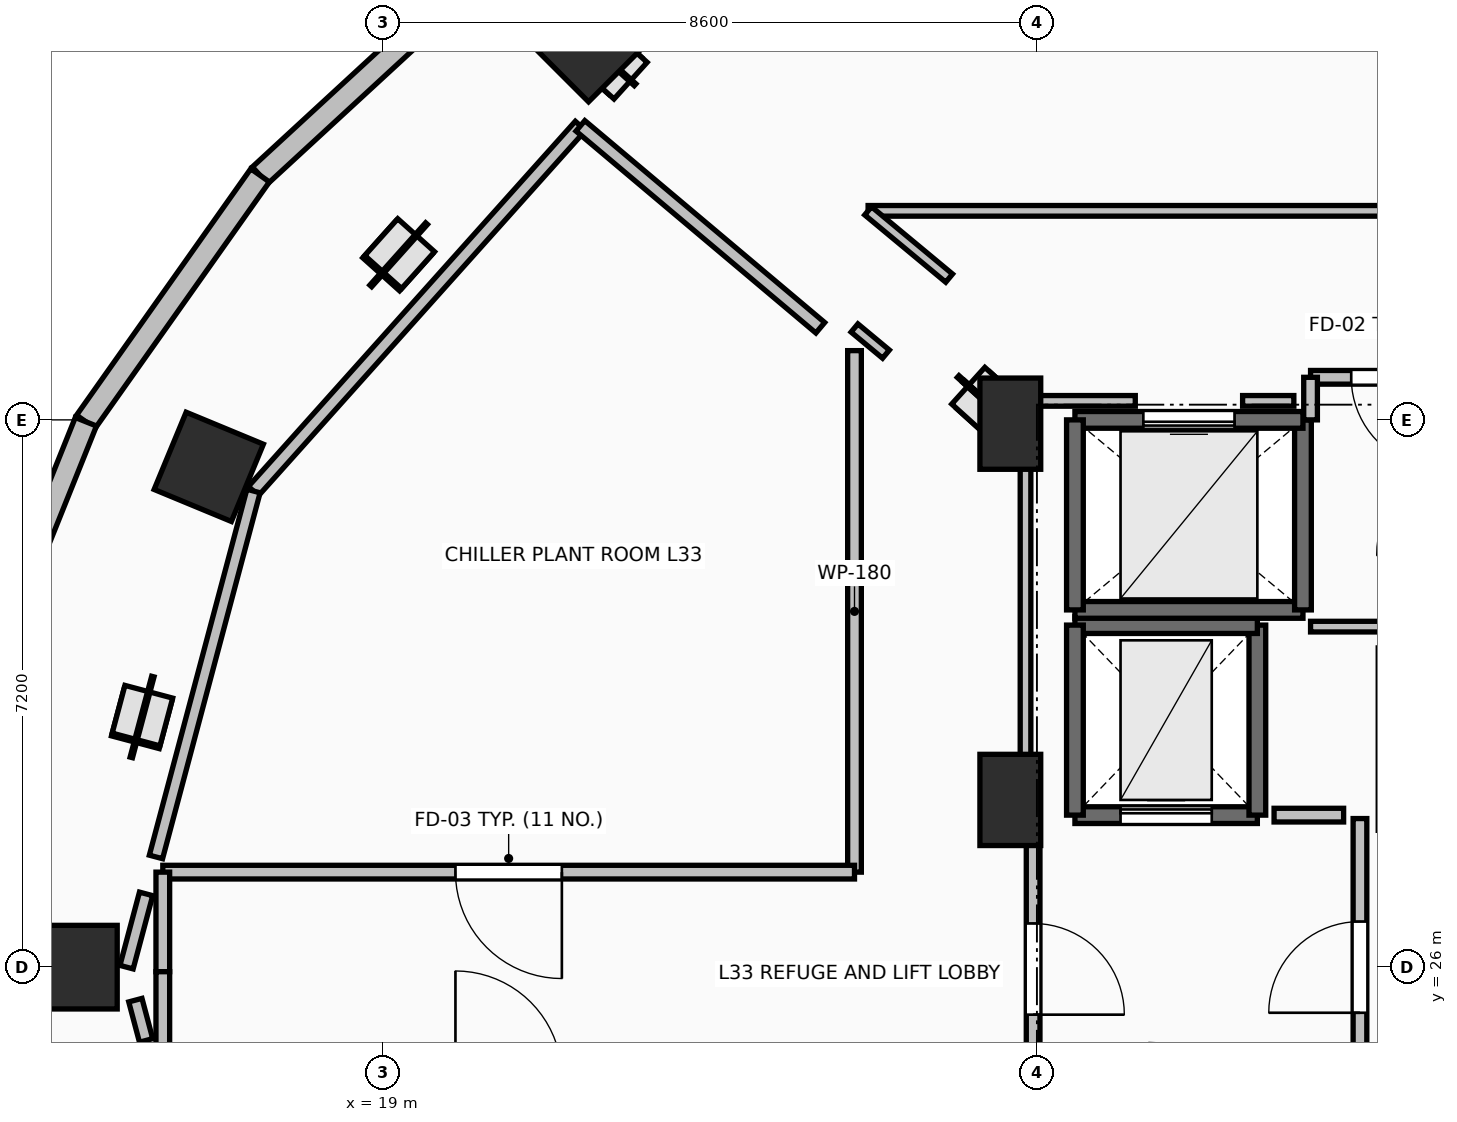
"""IFC4 building model, lengths in metres.
Left out: names, types, materials, properties, quantities, classifications, styles, units other than length and angle.
Written with IfcOpenShell. Run it as: python <this file> out.ifc"""

import sys

from ifc_helpers import new_model, si_unit, direction, frame, frame_2d, origin, origin_2d, place, context, subcontext, project, spatial, rectangle, extrude, element, fill, save


model = new_model("IFC4")
c1 = context("Model", 3, precision=1e-05, world=origin(), true_north=direction((0.0, 1.0)))
c2 = subcontext(c1, "Body", "Model", "MODEL_VIEW")
j1 = project(units=[si_unit("LENGTHUNIT", "METRE"), si_unit("PLANEANGLEUNIT", "RADIAN")], contexts=[c1])
p1 = place(None, origin())
s1 = spatial("IfcSite", under=j1, at=p1, CompositionType="ELEMENT")
p2 = place(p1, origin())
s2 = spatial("IfcBuilding", under=s1, at=p2, CompositionType="ELEMENT")
p3 = place(p2, frame((0.0, 0.0, 124.3)))
s3 = spatial("IfcBuildingStorey", under=s2, at=p3, CompositionType="ELEMENT", Elevation=124.3)
for number, where, z_axis, x_axis in (
    (1, (21.701, 38.162, 0.0), (0.0, 0.0, 1.0), (-0.707, 0.707, 0.0)),
    (2, (16.705, 32.582, 0.0), (0.0, 0.0, 1.0), (-0.924, 0.383, 0.0)),
    (3, (14.95, 26.0, 0.0), (0.0, 0.0, 1.0), (-1.0, 0.0, 0.0)),
):
    element("IfcColumn", number, at=place(p3, frame(where, z_axis=z_axis, x_axis=x_axis)), inside=s3, PredefinedType="COLUMN", context=c2, shape_type="SweptSolid", body=[
        extrude(rectangle(XDim=1.1, YDim=1.1, at=origin_2d()), origin(), (0.0, 0.0, 1.0), 4.8),
    ])
for number, where, z_axis, x_axis in (
    (4, (27.25, 28.2, 0.0), (0.0, 0.0, 1.0), (1.0, 0.0, 0.0)),
    (5, (27.25, 33.15, 0.0), (0.0, 0.0, 1.0), (1.0, 0.0, 0.0)),
):
    element("IfcColumn", number, at=place(p3, frame(where, z_axis=z_axis, x_axis=x_axis)), inside=s3, PredefinedType="PILASTER", context=c2, shape_type="SweptSolid", body=[
        extrude(rectangle(XDim=0.8, YDim=1.2, at=origin_2d()), origin(), (0.0, 0.0, 1.0), 4.8),
    ])
p4 = place(p3, frame((20.464, 39.258, 0.0), z_axis=(0.0, 0.0, 1.0), x_axis=(-0.735477154165, -0.677549522693, 0.0)))
e6 = element("IfcWall", 6, at=p4, inside=s3, PredefinedType="STANDARD", context=c2, shape_type="SweptSolid", body=[
    extrude(rectangle(XDim=4.194, YDim=0.3, at=frame_2d((2.097, 0.0))), origin(), (0.0, 0.0, 1.0), 4.54),
])
p5 = place(p3, frame((17.38, 36.417, 0.0), z_axis=(0.0, 0.0, 1.0), x_axis=(-0.577269753207, -0.816553508371, 0.0)))
e7 = element("IfcWall", 7, at=p5, inside=s3, PredefinedType="STANDARD", context=c2, shape_type="SweptSolid", body=[
    extrude(rectangle(XDim=3.97, YDim=0.3, at=frame_2d((1.985, 0.0))), origin(), (0.0, 0.0, 1.0), 4.54),
])
p6 = place(p3, frame((15.088, 33.175, 0.0), z_axis=(0.0, 0.0, 1.0), x_axis=(-0.372401154411, -0.928071861546, 0.0)))
e8 = element("IfcWall", 8, at=p6, inside=s3, PredefinedType="STANDARD", context=c2, shape_type="SweptSolid", body=[
    extrude(rectangle(XDim=3.79, YDim=0.3, at=frame_2d((1.895, 0.0))), origin(), (0.0, 0.0, 1.0), 4.54),
])
p7 = place(p3, frame((28.1, 28.0, 0.0), z_axis=(0.0, 0.0, 1.0), x_axis=(1.0, 0.0, 0.0)))
e9 = element("IfcWall", 9, at=p7, inside=s3, PredefinedType="SHEAR", context=c2, shape_type="SweptSolid", body=[
    extrude(rectangle(XDim=2.4, YDim=0.22, at=frame_2d((1.2, 0.0))), origin(), (0.0, 0.0, 1.0), 4.54),
])
p8 = place(p7, frame((0.6, 0.0, 0.0)))
e10 = element("IfcOpeningElement", 10, at=p8, cuts=e9, PredefinedType="OPENING", context=c2, shape_type="SweptSolid", body=[
    extrude(rectangle(XDim=1.2, YDim=2.2, at=frame_2d((0.6, 1.1))), frame((0.0, 0.125, 0.0), z_axis=(0.0, -1.0, 0.0), x_axis=(1.0, 0.0, 0.0)), (0.0, 0.0, 1.0), 0.25),
])
p9 = place(p3, frame((30.5, 28.0, 0.0), z_axis=(0.0, 0.0, 1.0), x_axis=(0.0, 1.0, 0.0)))
e11 = element("IfcWall", 11, at=p9, inside=s3, PredefinedType="SHEAR", context=c2, shape_type="SweptSolid", body=[
    extrude(rectangle(XDim=2.5, YDim=0.22, at=frame_2d((1.25, 0.0))), origin(), (0.0, 0.0, 1.0), 4.54),
])
p10 = place(p3, frame((30.5, 30.5, 0.0), z_axis=(0.0, 0.0, 1.0), x_axis=(-1.0, 0.0, 0.0)))
e12 = element("IfcWall", 12, at=p10, inside=s3, PredefinedType="SHEAR", context=c2, shape_type="SweptSolid", body=[
    extrude(rectangle(XDim=2.4, YDim=0.22, at=frame_2d((1.2, 0.0))), origin(), (0.0, 0.0, 1.0), 4.54),
])
p11 = place(p3, frame((28.1, 30.5, 0.0), z_axis=(0.0, 0.0, 1.0), x_axis=(0.0, -1.0, 0.0)))
e13 = element("IfcWall", 13, at=p11, inside=s3, PredefinedType="SHEAR", context=c2, shape_type="SweptSolid", body=[
    extrude(rectangle(XDim=2.5, YDim=0.22, at=frame_2d((1.25, 0.0))), origin(), (0.0, 0.0, 1.0), 4.54),
])
p12 = place(p3, frame((28.1, 30.7, 0.0), z_axis=(0.0, 0.0, 1.0), x_axis=(1.0, 0.0, 0.0)))
e14 = element("IfcWall", 14, at=p12, inside=s3, PredefinedType="SOLIDWALL", context=c2, shape_type="SweptSolid", body=[
    extrude(rectangle(XDim=3.0, YDim=0.22, at=frame_2d((1.5, 0.0))), origin(), (0.0, 0.0, 1.0), 4.54),
])
p13 = place(p3, frame((31.1, 30.7, 0.0), z_axis=(0.0, 0.0, 1.0), x_axis=(0.0, 1.0, 0.0)))
e15 = element("IfcWall", 15, at=p13, inside=s3, PredefinedType="SOLIDWALL", context=c2, shape_type="SweptSolid", body=[
    extrude(rectangle(XDim=2.5, YDim=0.22, at=frame_2d((1.25, 0.0))), origin(), (0.0, 0.0, 1.0), 4.54),
])
p14 = place(p3, frame((31.1, 33.2, 0.0), z_axis=(0.0, 0.0, 1.0), x_axis=(-1.0, 0.0, 0.0)))
e16 = element("IfcWall", 16, at=p14, inside=s3, PredefinedType="SOLIDWALL", context=c2, shape_type="SweptSolid", body=[
    extrude(rectangle(XDim=3.0, YDim=0.22, at=frame_2d((1.5, 0.0))), origin(), (0.0, 0.0, 1.0), 4.54),
])
p15 = place(p14, frame((0.9, 0.0, 0.0)))
e17 = element("IfcOpeningElement", 17, at=p15, cuts=e16, PredefinedType="OPENING", context=c2, shape_type="SweptSolid", body=[
    extrude(rectangle(XDim=1.2, YDim=2.2, at=frame_2d((0.6, 1.1))), frame((0.0, 0.125, 0.0), z_axis=(0.0, -1.0, 0.0), x_axis=(1.0, 0.0, 0.0)), (0.0, 0.0, 1.0), 0.25),
])
p16 = place(p3, frame((28.1, 33.2, 0.0), z_axis=(0.0, 0.0, 1.0), x_axis=(0.0, -1.0, 0.0)))
e18 = element("IfcWall", 18, at=p16, inside=s3, PredefinedType="SOLIDWALL", context=c2, shape_type="SweptSolid", body=[
    extrude(rectangle(XDim=2.5, YDim=0.22, at=frame_2d((1.25, 0.0))), origin(), (0.0, 0.0, 1.0), 4.54),
])
p17 = place(p3, frame((31.85, 24.045, 0.0), z_axis=(0.0, 0.0, 1.0), x_axis=(0.0, 1.0, 0.0)))
e19 = element("IfcWall", 19, at=p17, inside=s3, PredefinedType="PARTITIONING", context=c2, shape_type="SweptSolid", body=[
    extrude(rectangle(XDim=3.91, YDim=0.18, at=frame_2d((1.955, 0.0))), origin(), (0.0, 0.0, 1.0), 4.54),
])
p18 = place(p17, frame((1.355, 0.0, 0.0)))
e20 = element("IfcOpeningElement", 20, at=p18, cuts=e19, PredefinedType="OPENING", context=c2, shape_type="SweptSolid", body=[
    extrude(rectangle(XDim=1.2, YDim=2.15, at=frame_2d((0.6, 1.075))), frame((0.0, 0.105, 0.0), z_axis=(0.0, -1.0, 0.0), x_axis=(1.0, 0.0, 0.0)), (0.0, 0.0, 1.0), 0.21),
])
p19 = place(p3, frame((27.55, 28.0, 0.0), z_axis=(0.0, 0.0, 1.0), x_axis=(0.0, -1.0, 0.0)))
e21 = element("IfcWall", 21, at=p19, inside=s3, PredefinedType="PARTITIONING", context=c2, shape_type="SweptSolid", body=[
    extrude(rectangle(XDim=4.05, YDim=0.18, at=frame_2d((2.025, 0.0))), origin(), (0.0, 0.0, 1.0), 3.522),
])
p20 = place(p19, frame((1.425, 0.0, 0.0)))
e22 = element("IfcOpeningElement", 22, at=p20, cuts=e21, PredefinedType="OPENING", context=c2, shape_type="SweptSolid", body=[
    extrude(rectangle(XDim=1.2, YDim=2.15, at=frame_2d((0.6, 1.075))), frame((0.0, 0.105, 0.0), z_axis=(0.0, -1.0, 0.0), x_axis=(1.0, 0.0, 0.0)), (0.0, 0.0, 1.0), 0.21),
])
p21 = place(p3, frame((33.47, 33.76, 0.0), z_axis=(0.0, 0.0, 1.0), x_axis=(-1.0, 0.0, 0.0)))
e23 = element("IfcWall", 23, at=p21, inside=s3, PredefinedType="PARTITIONING", context=c2, shape_type="SweptSolid", body=[
    extrude(rectangle(XDim=2.27, YDim=0.18, at=frame_2d((1.135, 0.0))), origin(), (0.0, 0.0, 1.0), 4.54),
])
p22 = place(p21, frame((0.535, 0.0, 0.0)))
e24 = element("IfcOpeningElement", 24, at=p22, cuts=e23, PredefinedType="OPENING", context=c2, shape_type="SweptSolid", body=[
    extrude(rectangle(XDim=1.2, YDim=2.15, at=frame_2d((0.6, 1.075))), frame((0.0, 0.105, 0.0), z_axis=(0.0, -1.0, 0.0), x_axis=(1.0, 0.0, 0.0)), (0.0, 0.0, 1.0), 0.21),
])
p23 = place(p3, frame((31.2, 33.76, 0.0), z_axis=(0.0, 0.0, 1.0), x_axis=(0.0, -1.0, 0.0)))
e25 = element("IfcWall", 25, at=p23, inside=s3, PredefinedType="PARTITIONING", context=c2, shape_type="SweptSolid", body=[
    extrude(rectangle(XDim=0.56, YDim=0.18, at=frame_2d((0.28, 0.0))), origin(), (0.0, 0.0, 1.0), 4.54),
])
p24 = place(p3, frame((25.2, 34.111, 0.0), z_axis=(0.0, 0.0, 1.0), x_axis=(0.0, -1.0, 0.0)))
e26 = element("IfcWall", 26, at=p24, inside=s3, PredefinedType="PARTITIONING", context=c2, shape_type="SweptSolid", body=[
    extrude(rectangle(XDim=6.861, YDim=0.18, at=frame_2d((3.431, 0.0))), origin(), (0.0, 0.0, 1.0), 3.522),
])
p25 = place(p3, frame((25.2, 27.25, 0.0), z_axis=(0.0, 0.0, 1.0), x_axis=(-1.0, 0.0, 0.0)))
e27 = element("IfcWall", 27, at=p25, inside=s3, PredefinedType="PARTITIONING", context=c2, shape_type="SweptSolid", body=[
    extrude(rectangle(XDim=9.1, YDim=0.18, at=frame_2d((4.55, 0.0))), origin(), (0.0, 0.0, 1.0), 3.522),
])
p26 = place(p25, frame((3.85, 0.0, 0.0)))
e28 = element("IfcOpeningElement", 28, at=p26, cuts=e27, PredefinedType="OPENING", context=c2, shape_type="SweptSolid", body=[
    extrude(rectangle(XDim=1.4, YDim=2.2, at=frame_2d((0.7, 1.1))), frame((0.0, 0.105, 0.0), z_axis=(0.0, -1.0, 0.0), x_axis=(1.0, 0.0, 0.0)), (0.0, 0.0, 1.0), 0.21),
])
p27 = place(p3, frame((16.1, 27.25, 0.0), z_axis=(0.0, 0.0, 1.0), x_axis=(0.0, -1.0, 0.0)))
e29 = element("IfcWall", 29, at=p27, inside=s3, PredefinedType="PARTITIONING", context=c2, shape_type="SweptSolid", body=[
    extrude(rectangle(XDim=1.31, YDim=0.18, at=frame_2d((0.655, 0.0))), origin(), (0.0, 0.0, 1.0), 3.522),
])
p28 = place(p3, frame((16.1, 25.94, 0.0), z_axis=(0.0, 0.0, 1.0), x_axis=(0.0, -1.0, 0.0)))
e30 = element("IfcWall", 30, at=p28, inside=s3, PredefinedType="PARTITIONING", context=c2, shape_type="SweptSolid", body=[
    extrude(rectangle(XDim=1.39, YDim=0.18, at=frame_2d((0.695, 0.0))), origin(), (0.0, 0.0, 1.0), 3.522),
])
p29 = place(p3, frame((31.635, 28.0, 0.0), z_axis=(0.0, 0.0, 1.0), x_axis=(-1.0, 0.0, 0.0)))
e31 = element("IfcWall", 31, at=p29, inside=s3, PredefinedType="PARTITIONING", context=c2, shape_type="SweptSolid", body=[
    extrude(rectangle(XDim=0.915, YDim=0.18, at=frame_2d((0.458, 0.0))), origin(), (0.0, 0.0, 1.0), 4.54),
])
p30 = place(p3, frame((31.2, 30.48, 0.0), z_axis=(0.0, 0.0, 1.0), x_axis=(1.0, 0.0, 0.0)))
e32 = element("IfcWall", 32, at=p30, inside=s3, PredefinedType="PARTITIONING", context=c2, shape_type="SweptSolid", body=[
    extrude(rectangle(XDim=2.05, YDim=0.14, at=frame_2d((1.025, 0.0))), origin(), (0.0, 0.0, 1.0), 4.54),
])
p31 = place(p3, frame((33.594, 35.95, 0.0), z_axis=(0.0, 0.0, 1.0), x_axis=(-1.0, 0.0, 0.0)))
e33 = element("IfcWall", 33, at=p31, inside=s3, PredefinedType="PARTITIONING", context=c2, shape_type="SweptSolid", body=[
    extrude(rectangle(XDim=8.215, YDim=0.14, at=frame_2d((4.107, 0.0))), origin(), (0.0, 0.0, 1.0), 3.522),
])
p32 = place(p3, frame((25.379, 35.95, 0.0), z_axis=(0.0, 0.0, 1.0), x_axis=(0.769447461533, -0.638710109471, 0.0)))
e34 = element("IfcWall", 34, at=p32, inside=s3, PredefinedType="PARTITIONING", context=c2, shape_type="SweptSolid", body=[
    extrude(rectangle(XDim=1.386, YDim=0.14, at=frame_2d((0.693, 0.0))), origin(), (0.0, 0.0, 1.0), 4.174),
])
p33 = place(p3, frame((25.614, 34.065, 0.0), z_axis=(0.0, 0.0, 1.0), x_axis=(-0.769186943462, 0.639023822723, 0.0)))
e35 = element("IfcWall", 35, at=p33, inside=s3, PredefinedType="PARTITIONING", context=c2, shape_type="SweptSolid", body=[
    extrude(rectangle(XDim=0.538, YDim=0.14, at=frame_2d((0.269, 0.0))), origin(), (0.0, 0.0, 1.0), 4.174),
])
p34 = place(p3, frame((30.98, 33.45, 0.0), z_axis=(0.0, 0.0, 1.0), x_axis=(-1.0, 0.0, 0.0)))
e36 = element("IfcWall", 36, at=p34, inside=s3, PredefinedType="PARTITIONING", context=c2, shape_type="SweptSolid", body=[
    extrude(rectangle(XDim=0.674, YDim=0.14, at=frame_2d((0.337, 0.0))), origin(), (0.0, 0.0, 1.0), 4.54),
])
p35 = place(p3, frame((28.894, 33.45, 0.0), z_axis=(0.0, 0.0, 1.0), x_axis=(-1.0, 0.0, 0.0)))
e37 = element("IfcWall", 37, at=p35, inside=s3, PredefinedType="PARTITIONING", context=c2, shape_type="SweptSolid", body=[
    extrude(rectangle(XDim=1.444, YDim=0.14, at=frame_2d((0.722, 0.0))), origin(), (0.0, 0.0, 1.0), 3.522),
])
p36 = place(p3, frame((27.45, 33.45, 0.0), z_axis=(0.0, 0.0, 1.0), x_axis=(0.0, -1.0, 0.0)))
e38 = element("IfcWall", 38, at=p36, inside=s3, PredefinedType="PARTITIONING", context=c2, shape_type="SweptSolid", body=[
    extrude(rectangle(XDim=5.254, YDim=0.14, at=frame_2d((2.627, 0.0))), origin(), (0.0, 0.0, 1.0), 3.522),
])
p37 = place(p3, frame((30.709, 43.601, 0.0), z_axis=(0.0, 0.0, 1.0), x_axis=(0.382774255296, -0.923841907191, 0.0)))
e39 = element("IfcWall", 39, at=p37, inside=s3, PredefinedType="PARTITIONING", context=c2, shape_type="SweptSolid", body=[
    extrude(rectangle(XDim=7.809, YDim=0.18, at=frame_2d((3.904, 0.0))), origin(), (0.0, 0.0, 1.0), 3.522),
])
p38 = place(p3, frame((21.594, 37.068, 0.0), z_axis=(0.0, 0.0, 1.0), x_axis=(-0.667012857152, -0.745046205543, 0.0)))
e40 = element("IfcWall", 40, at=p38, inside=s3, PredefinedType="PARTITIONING", context=c2, shape_type="SweptSolid", body=[
    extrude(rectangle(XDim=6.448, YDim=0.18, at=frame_2d((3.224, 0.0))), origin(), (0.0, 0.0, 1.0), 3.522),
])
p39 = place(p3, frame((17.293, 32.264, 0.0), z_axis=(0.0, 0.0, 1.0), x_axis=(-0.257519293952, -0.96627315664, 0.0)))
e41 = element("IfcWall", 41, at=p39, inside=s3, PredefinedType="PARTITIONING", context=c2, shape_type="SweptSolid", body=[
    extrude(rectangle(XDim=4.982, YDim=0.18, at=frame_2d((2.491, 0.0))), origin(), (0.0, 0.0, 1.0), 3.522),
])
p40 = place(p3, frame((15.88, 26.964, 0.0), z_axis=(0.0, 0.0, 1.0), x_axis=(-0.257418962866, -0.966299890074, 0.0)))
e42 = element("IfcWall", 42, at=p40, inside=s3, PredefinedType="PARTITIONING", context=c2, shape_type="SweptSolid", body=[
    extrude(rectangle(XDim=0.998, YDim=0.18, at=frame_2d((0.499, 0.0))), origin(), (0.0, 0.0, 1.0), 3.522),
])
p41 = place(p3, frame((24.75, 34.412, 0.0), z_axis=(0.0, 0.0, 1.0), x_axis=(-0.765112224477, 0.643896951349, 0.0)))
e43 = element("IfcWall", 43, at=p41, inside=s3, PredefinedType="PARTITIONING", context=c2, shape_type="SweptSolid", body=[
    extrude(rectangle(XDim=4.125, YDim=0.18, at=frame_2d((2.062, 0.0))), origin(), (0.0, 0.0, 1.0), 4.229),
])
p42 = place(p3, frame((15.739, 25.566, 0.0), z_axis=(0.0, 0.0, 1.0), x_axis=(0.256859051488, -0.966448874835, 0.0)))
e44 = element("IfcWall", 44, at=p42, inside=s3, PredefinedType="PARTITIONING", context=c2, shape_type="SweptSolid", body=[
    extrude(rectangle(XDim=0.548, YDim=0.18, at=frame_2d((0.274, 0.0))), origin(), (0.0, 0.0, 1.0), 4.54),
])
p43 = place(p8, origin())
e45 = element("IfcDoor", 45, at=p43, inside=s3, OperationType="SLIDING_TO_LEFT", PredefinedType="DOOR", context=c2, shape_type="SweptSolid", body=[
    extrude(rectangle(XDim=1.2, YDim=2.2, at=frame_2d((0.6, 1.1))), frame((0.0, 0.025, 0.0), z_axis=(0.0, -1.0, 0.0), x_axis=(1.0, 0.0, 0.0)), (0.0, 0.0, 1.0), 0.05),
])
fill(e10, e45)
p44 = place(p15, origin())
e46 = element("IfcDoor", 46, at=p44, inside=s3, OperationType="SLIDING_TO_LEFT", PredefinedType="DOOR", context=c2, shape_type="SweptSolid", body=[
    extrude(rectangle(XDim=1.2, YDim=2.2, at=frame_2d((0.6, 1.1))), frame((0.0, 0.025, 0.0), z_axis=(0.0, -1.0, 0.0), x_axis=(1.0, 0.0, 0.0)), (0.0, 0.0, 1.0), 0.05),
])
fill(e17, e46)
p45 = place(p18, origin())
e47 = element("IfcDoor", 47, at=p45, inside=s3, OperationType="SINGLE_SWING_LEFT", PredefinedType="DOOR", context=c2, shape_type="SweptSolid", body=[
    extrude(rectangle(XDim=1.2, YDim=2.15, at=frame_2d((0.6, 1.075))), frame((0.0, 0.025, 0.0), z_axis=(0.0, -1.0, 0.0), x_axis=(1.0, 0.0, 0.0)), (0.0, 0.0, 1.0), 0.05),
])
fill(e20, e47)
p46 = place(p20, origin())
e48 = element("IfcDoor", 48, at=p46, inside=s3, OperationType="SINGLE_SWING_RIGHT", PredefinedType="DOOR", context=c2, shape_type="SweptSolid", body=[
    extrude(rectangle(XDim=1.2, YDim=2.15, at=frame_2d((0.6, 1.075))), frame((0.0, 0.025, 0.0), z_axis=(0.0, -1.0, 0.0), x_axis=(1.0, 0.0, 0.0)), (0.0, 0.0, 1.0), 0.05),
])
fill(e22, e48)
p47 = place(p22, origin())
e49 = element("IfcDoor", 49, at=p47, inside=s3, OperationType="SINGLE_SWING_LEFT", PredefinedType="DOOR", context=c2, shape_type="SweptSolid", body=[
    extrude(rectangle(XDim=1.2, YDim=2.15, at=frame_2d((0.6, 1.075))), frame((0.0, 0.025, 0.0), z_axis=(0.0, -1.0, 0.0), x_axis=(1.0, 0.0, 0.0)), (0.0, 0.0, 1.0), 0.05),
])
fill(e24, e49)
p48 = place(p26, origin())
e50 = element("IfcDoor", 50, at=p48, inside=s3, OperationType="DOUBLE_SWING_LEFT", PredefinedType="DOOR", context=c2, shape_type="SweptSolid", body=[
    extrude(rectangle(XDim=1.4, YDim=2.2, at=frame_2d((0.7, 1.1))), frame((0.0, 0.025, 0.0), z_axis=(0.0, -1.0, 0.0), x_axis=(1.0, 0.0, 0.0)), (0.0, 0.0, 1.0), 0.05),
])
fill(e28, e50)
save(model, sys.argv[1])
